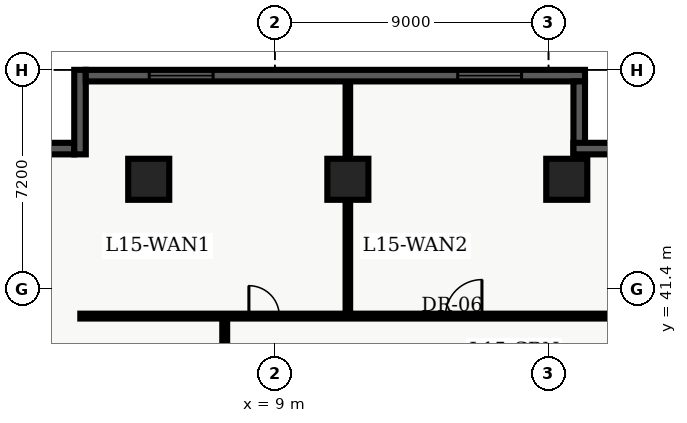
"""IFC4 building model, lengths in metres.
Left out: names, types, materials, properties, quantities, classifications, styles, units other than length and angle.
Written with IfcOpenShell. Run it as: python <this file> out.ifc"""

import sys

from ifc_helpers import new_model, entity, si_unit, converted_unit, direction, frame, origin_with_axes, origin_2d_with_axis, place, context, subcontext, project, spatial, polyline, rectangle, outline, extrude, element, fill, save


model = new_model("IFC4")
c1 = context("Model", 3, precision=1e-05, world=origin_with_axes(), true_north=direction((0.0, 1.0)))
c2 = subcontext(c1, "Body", "Model", "MODEL_VIEW")
j1 = project(units=[si_unit("LENGTHUNIT", "METRE"), converted_unit("PLANEANGLEUNIT", "DEGREE", entity("IfcPlaneAngleMeasure", 0.017), si_unit("PLANEANGLEUNIT", "RADIAN"), dimensions=[0, 0, 0, 0, 0, 0, 0])], contexts=[c1])
p1 = place(None, origin_with_axes())
s1 = spatial("IfcSite", under=j1, at=p1, CompositionType="ELEMENT")
p2 = place(p1, origin_with_axes())
s2 = spatial("IfcBuilding", under=s1, at=p2, CompositionType="ELEMENT")
p3 = place(p2, frame((0.0, 0.0, 63.9), z_axis=(0.0, 0.0, 1.0), x_axis=(1.0, 0.0, 0.0)))
s3 = spatial("IfcBuildingStorey", under=s2, at=p3, CompositionType="ELEMENT", Elevation=63.9)
for number, where, z_axis, x_axis in (
    (1, (11.4, 45.0, 0.0), (0.0, 0.0, 1.0), (1.0, 0.0, 0.0)),
    (2, (18.6, 45.0, 0.0), (0.0, 0.0, 1.0), (1.0, 0.0, 0.0)),
    (3, (4.85, 45.0, 0.0), (0.0, 0.0, 1.0), (1.0, 0.0, 0.0)),
):
    element("IfcColumn", number, at=place(p3, frame(where, z_axis=z_axis, x_axis=x_axis)), inside=s3, PredefinedType="COLUMN", context=c2, shape_type="SweptSolid", body=[
        extrude(rectangle(XDim=1.35, YDim=1.35, at=origin_2d_with_axis()), origin_with_axes(), (0.0, 0.0, 1.0), 3.9),
    ])
p4 = place(p3, frame((2.6, 40.5, 0.0), z_axis=(0.0, 0.0, 1.0), x_axis=(1.0, 0.0, 0.0)))
e4 = element("IfcWall", 4, at=p4, inside=s3, PredefinedType="PARTITIONING", context=c2, shape_type="SweptSolid", body=[
    extrude(outline(polyline([(0.0, -0.08), (18.65, -0.08), (18.65, 0.08), (0.0, 0.08), (0.0, -0.08)])), origin_with_axes(), (0.0, 0.0, 1.0), 2.7),
])
p5 = place(p4, frame((6.045, 0.0, 0.0), z_axis=(0.0, 0.0, 1.0), x_axis=(1.0, 0.0, 0.0)))
e5 = element("IfcOpeningElement", 5, at=p5, cuts=e4, PredefinedType="OPENING", context=c2, shape_type="SweptSolid", body=[
    extrude(rectangle(XDim=1.0, YDim=0.18, at=origin_2d_with_axis()), origin_with_axes(), (0.0, 0.0, 1.0), 2.15),
])
p6 = place(p4, frame((12.61, 0.0, 0.0), z_axis=(0.0, 0.0, 1.0), x_axis=(1.0, 0.0, 0.0)))
e6 = element("IfcOpeningElement", 6, at=p6, cuts=e4, PredefinedType="OPENING", context=c2, shape_type="SweptSolid", body=[
    extrude(rectangle(XDim=1.2, YDim=0.18, at=origin_2d_with_axis()), origin_with_axes(), (0.0, 0.0, 1.0), 2.2),
])
p7 = place(p3, frame((7.35, 7.8, 0.0), z_axis=(0.0, 0.0, 1.0), x_axis=(0.0, 1.0, 0.0)))
e7 = element("IfcWall", 7, at=p7, inside=s3, PredefinedType="PARTITIONING", context=c2, shape_type="SweptSolid", body=[
    extrude(outline(polyline([(0.0, -0.08), (32.7, -0.08), (32.7, 0.08), (0.0, 0.08), (0.0, -0.08)])), origin_with_axes(), (0.0, 0.0, 1.0), 2.7),
])
p8 = place(p7, frame((4.379, 0.0, 0.0), z_axis=(0.0, 0.0, 1.0), x_axis=(1.0, 0.0, 0.0)))
e8 = element("IfcOpeningElement", 8, at=p8, cuts=e7, PredefinedType="OPENING", context=c2, shape_type="SweptSolid", body=[
    extrude(rectangle(XDim=1.0, YDim=0.18, at=origin_2d_with_axis()), origin_with_axes(), (0.0, 0.0, 1.0), 2.15),
])
p9 = place(p7, frame((14.008, 0.0, 0.0), z_axis=(0.0, 0.0, 1.0), x_axis=(1.0, 0.0, 0.0)))
e9 = element("IfcOpeningElement", 9, at=p9, cuts=e7, PredefinedType="OPENING", context=c2, shape_type="SweptSolid", body=[
    extrude(rectangle(XDim=1.0, YDim=0.18, at=origin_2d_with_axis()), origin_with_axes(), (0.0, 0.0, 1.0), 2.15),
])
p10 = place(p7, frame((25.979, 0.0, 0.0), z_axis=(0.0, 0.0, 1.0), x_axis=(1.0, 0.0, 0.0)))
e10 = element("IfcOpeningElement", 10, at=p10, cuts=e7, PredefinedType="OPENING", context=c2, shape_type="SweptSolid", body=[
    extrude(rectangle(XDim=1.0, YDim=0.18, at=origin_2d_with_axis()), origin_with_axes(), (0.0, 0.0, 1.0), 2.15),
])
p11 = place(p3, frame((11.4, 40.6, 0.0), z_axis=(0.0, 0.0, 1.0), x_axis=(0.0, 1.0, 0.0)))
e11 = element("IfcWall", 11, at=p11, inside=s3, PredefinedType="PARTITIONING", context=c2, shape_type="SweptSolid", body=[
    extrude(outline(polyline([(0.0, -0.075), (7.64, -0.075), (7.64, 0.075), (0.0, 0.075), (0.0, -0.075)])), origin_with_axes(), (0.0, 0.0, 1.0), 2.7),
])
p12 = place(p3, frame((0.38, 46.01, 0.0), z_axis=(0.0, 0.0, 1.0), x_axis=(1.0, 0.0, 0.0)))
e12 = element("IfcWall", 12, at=p12, inside=s3, PredefinedType="SOLIDWALL", context=c2, shape_type="SweptSolid", body=[
    extrude(outline(polyline([(0.0, -0.19), (2.02, -0.19), (2.02, 0.19), (0.0, 0.19), (0.0, -0.19)])), origin_with_axes(), (0.0, 0.0, 1.0), 3.66),
])
p13 = place(p3, frame((2.59, 45.82, 0.0), z_axis=(0.0, 0.0, 1.0), x_axis=(0.0, 1.0, 0.0)))
e13 = element("IfcWall", 13, at=p13, inside=s3, PredefinedType="SOLIDWALL", context=c2, shape_type="SweptSolid", body=[
    extrude(outline(polyline([(0.0, -0.19), (2.78, -0.19), (2.78, 0.19), (0.0, 0.19), (0.0, -0.19)])), origin_with_axes(), (0.0, 0.0, 1.0), 3.66),
])
p14 = place(p3, frame((2.78, 48.41, 0.0), z_axis=(0.0, 0.0, 1.0), x_axis=(1.0, 0.0, 0.0)))
e14 = element("IfcWall", 14, at=p14, inside=s3, PredefinedType="SOLIDWALL", context=c2, shape_type="SweptSolid", body=[
    extrude(outline(polyline([(0.0, -0.19), (16.42, -0.19), (16.42, 0.19), (0.0, 0.19), (0.0, -0.19)])), origin_with_axes(), (0.0, 0.0, 1.0), 3.66),
])
p15 = place(p14, frame((3.137, 0.0, 0.45), z_axis=(0.0, 0.0, 1.0), x_axis=(1.0, 0.0, 0.0)))
e15 = element("IfcOpeningElement", 15, at=p15, cuts=e14, PredefinedType="OPENING", context=c2, shape_type="SweptSolid", body=[
    extrude(rectangle(XDim=2.1, YDim=0.4, at=origin_2d_with_axis()), origin_with_axes(), (0.0, 0.0, 1.0), 2.2),
])
p16 = place(p14, frame((13.283, 0.0, 0.45), z_axis=(0.0, 0.0, 1.0), x_axis=(1.0, 0.0, 0.0)))
e16 = element("IfcOpeningElement", 16, at=p16, cuts=e14, PredefinedType="OPENING", context=c2, shape_type="SweptSolid", body=[
    extrude(rectangle(XDim=2.1, YDim=0.4, at=origin_2d_with_axis()), origin_with_axes(), (0.0, 0.0, 1.0), 2.2),
])
p17 = place(p3, frame((19.01, 48.22, 0.0), z_axis=(0.0, 0.0, 1.0), x_axis=(0.0, -1.0, 0.0)))
e17 = element("IfcWall", 17, at=p17, inside=s3, PredefinedType="SOLIDWALL", context=c2, shape_type="SweptSolid", body=[
    extrude(outline(polyline([(0.0, -0.19), (2.56, -0.19), (2.56, 0.19), (0.0, 0.19), (0.0, -0.19)])), origin_with_axes(), (0.0, 0.0, 1.0), 3.66),
])
p18 = place(p3, frame((18.82, 46.01, 0.0), z_axis=(0.0, 0.0, 1.0), x_axis=(1.0, 0.0, 0.0)))
e18 = element("IfcWall", 18, at=p18, inside=s3, PredefinedType="SOLIDWALL", context=c2, shape_type="SweptSolid", body=[
    extrude(outline(polyline([(0.0, -0.19), (2.78, -0.19), (2.78, 0.19), (0.0, 0.19), (0.0, -0.19)])), origin_with_axes(), (0.0, 0.0, 1.0), 3.66),
])
p19 = place(p4, frame((6.045, 0.0, 0.0), z_axis=(0.0, 0.0, 1.0), x_axis=(1.0, 0.0, 0.0)))
e19 = element("IfcDoor", 19, at=p19, inside=s3, OperationType="SINGLE_SWING_LEFT", PredefinedType="DOOR", context=c2, shape_type="SweptSolid", body=[
    extrude(rectangle(XDim=1.0, YDim=0.09, at=origin_2d_with_axis()), origin_with_axes(), (0.0, 0.0, 1.0), 2.15),
])
fill(e5, e19)
p20 = place(p4, frame((12.61, 0.0, 0.0), z_axis=(0.0, 0.0, 1.0), x_axis=(1.0, 0.0, 0.0)))
e20 = element("IfcDoor", 20, at=p20, inside=s3, OperationType="SINGLE_SWING_RIGHT", PredefinedType="DOOR", context=c2, shape_type="SweptSolid", body=[
    extrude(rectangle(XDim=1.2, YDim=0.09, at=origin_2d_with_axis()), origin_with_axes(), (0.0, 0.0, 1.0), 2.2),
])
fill(e6, e20)
p21 = place(p14, frame((3.137, 0.0, 0.45), z_axis=(0.0, 0.0, 1.0), x_axis=(1.0, 0.0, 0.0)))
e21 = element("IfcWindow", 21, at=p21, inside=s3, PredefinedType="WINDOW", context=c2, shape_type="SweptSolid", body=[
    extrude(rectangle(XDim=2.1, YDim=0.09, at=origin_2d_with_axis()), origin_with_axes(), (0.0, 0.0, 1.0), 2.2),
])
fill(e15, e21)
p22 = place(p14, frame((13.283, 0.0, 0.45), z_axis=(0.0, 0.0, 1.0), x_axis=(1.0, 0.0, 0.0)))
e22 = element("IfcWindow", 22, at=p22, inside=s3, PredefinedType="WINDOW", context=c2, shape_type="SweptSolid", body=[
    extrude(rectangle(XDim=2.1, YDim=0.09, at=origin_2d_with_axis()), origin_with_axes(), (0.0, 0.0, 1.0), 2.2),
])
fill(e16, e22)
save(model, sys.argv[1])
